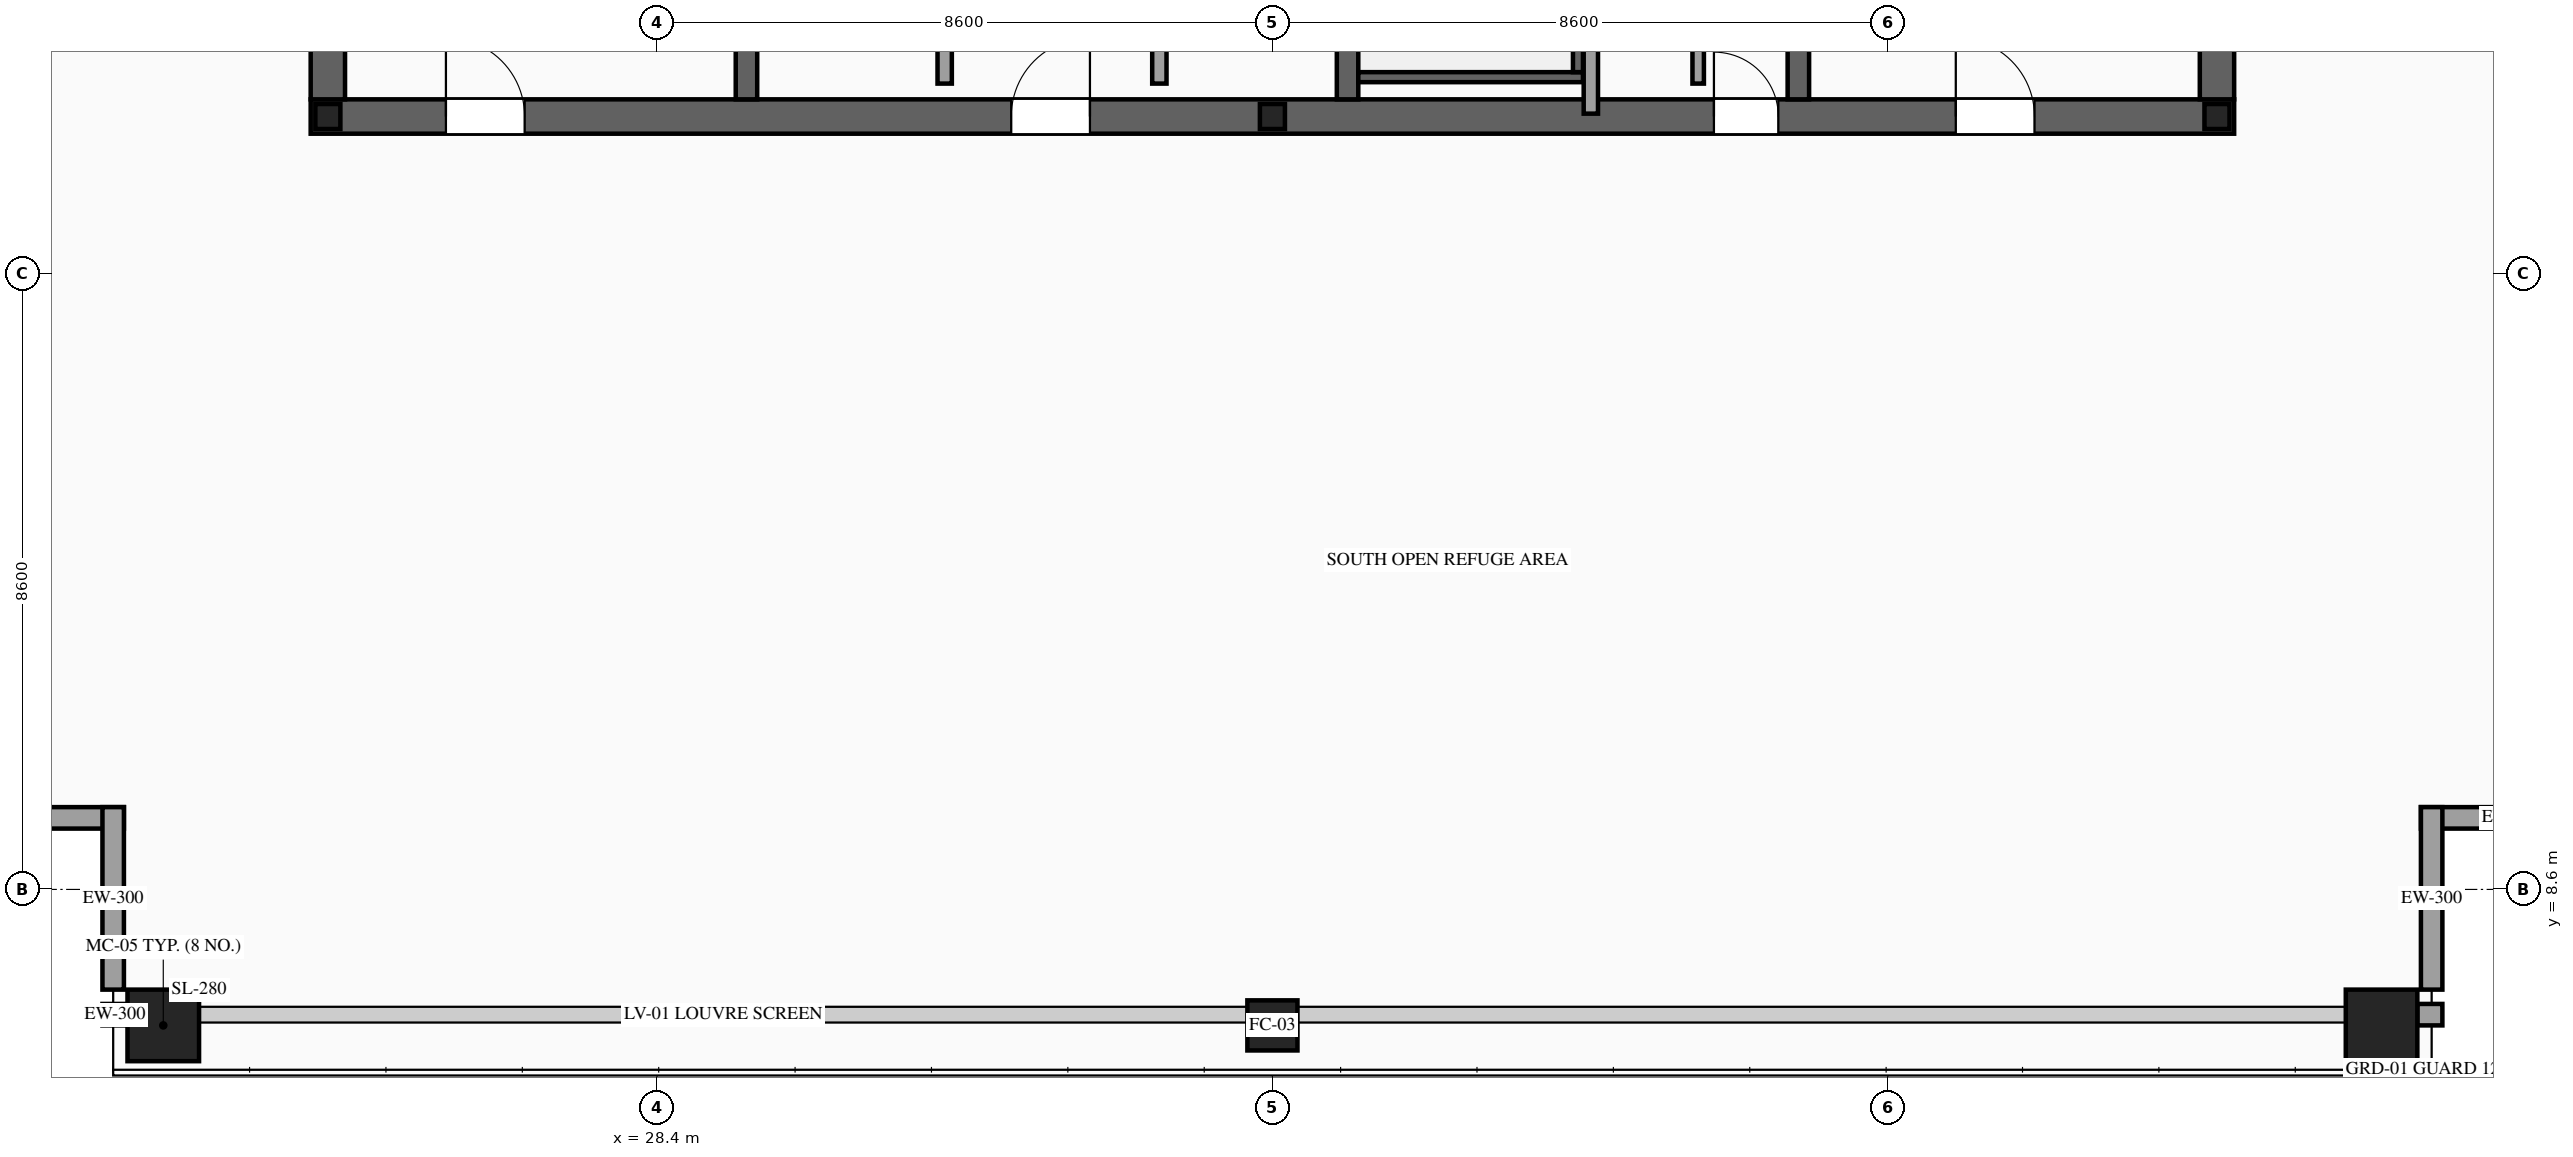
"""IFC4 building model, lengths in metres.
Left out: names, types, materials, properties, quantities, classifications, styles, units other than length and angle.
Written with IfcOpenShell. Run it as: python <this file> out.ifc"""

import sys

from ifc_helpers import new_model, si_unit, direction, frame, frame_2d, origin, origin_2d, place, context, subcontext, project, spatial, rectangle, hollow_rectangle, i_section, extrude, source, transform, mapped, element, fill, save


model = new_model("IFC4")
c1 = context("Model", 3, precision=1e-05, world=origin(), true_north=direction((0.0, 1.0)))
c2 = subcontext(c1, "Body", "Model", "MODEL_VIEW")
j1 = project(units=[si_unit("LENGTHUNIT", "METRE"), si_unit("PLANEANGLEUNIT", "RADIAN")], contexts=[c1])
p1 = place(None, origin())
s1 = spatial("IfcSite", under=j1, at=p1, CompositionType="ELEMENT")
p2 = place(p1, origin())
s2 = spatial("IfcBuilding", under=s1, at=p2, CompositionType="ELEMENT")
p3 = place(p2, frame((0.0, 0.0, 306.6)))
s3 = spatial("IfcBuildingStorey", under=s2, at=p3, CompositionType="ELEMENT", Elevation=306.6)
p4 = place(p3, frame((23.56, 19.4, 0.0), z_axis=(0.0, 0.0, 1.0), x_axis=(1.0, 0.0, 0.0)))
e1 = element("IfcWall", 1, at=p4, inside=s3, PredefinedType="SHEAR", context=c2, shape_type="SweptSolid", body=[
    extrude(rectangle(XDim=26.88, YDim=0.48, at=frame_2d((13.44, 0.0))), origin(), (0.0, 0.0, 1.0), 4.6),
])
p5 = place(p4, frame((1.89, 0.0, 0.0)))
e2 = element("IfcOpeningElement", 2, at=p5, cuts=e1, PredefinedType="OPENING", context=c2, shape_type="SweptSolid", body=[
    extrude(rectangle(XDim=1.1, YDim=2.2, at=frame_2d((0.55, 1.1))), frame((0.0, 0.255, 0.0), z_axis=(0.0, -1.0, 0.0), x_axis=(1.0, 0.0, 0.0)), (0.0, 0.0, 1.0), 0.51),
])
p6 = place(p4, frame((9.79, 0.0, 0.0)))
e3 = element("IfcOpeningElement", 3, at=p6, cuts=e1, PredefinedType="OPENING", context=c2, shape_type="SweptSolid", body=[
    extrude(rectangle(XDim=1.1, YDim=2.2, at=frame_2d((0.55, 1.1))), frame((0.0, 0.255, 0.0), z_axis=(0.0, -1.0, 0.0), x_axis=(1.0, 0.0, 0.0)), (0.0, 0.0, 1.0), 0.51),
])
p7 = place(p4, frame((22.99, 0.0, 0.0)))
e4 = element("IfcOpeningElement", 4, at=p7, cuts=e1, PredefinedType="OPENING", context=c2, shape_type="SweptSolid", body=[
    extrude(rectangle(XDim=1.1, YDim=2.2, at=frame_2d((0.55, 1.1))), frame((0.0, 0.255, 0.0), z_axis=(0.0, -1.0, 0.0), x_axis=(1.0, 0.0, 0.0)), (0.0, 0.0, 1.0), 0.51),
])
p8 = place(p4, frame((19.61, 0.0, 0.0)))
e5 = element("IfcOpeningElement", 5, at=p8, cuts=e1, PredefinedType="OPENING", context=c2, shape_type="SweptSolid", body=[
    extrude(rectangle(XDim=0.9, YDim=2.15, at=frame_2d((0.45, 1.075))), frame((0.0, 0.255, 0.0), z_axis=(0.0, -1.0, 0.0), x_axis=(1.0, 0.0, 0.0)), (0.0, 0.0, 1.0), 0.51),
])
m1 = source(origin(), c2, "Body", "SweptSolid", [
    extrude(rectangle(XDim=12.32, YDim=0.48, at=frame_2d((6.16, 0.0))), origin(), (0.0, 0.0, 1.0), 4.6),
])
for number, where, z_axis, x_axis in (
    (6, (23.8, 19.64, 0.0), (0.0, 0.0, 1.0), (0.0, 1.0, 0.0)),
    (7, (50.2, 19.64, 0.0), (0.0, 0.0, 1.0), (0.0, 1.0, 0.0)),
):
    element("IfcWall", number, at=place(p3, frame(where, z_axis=z_axis, x_axis=x_axis)), inside=s3, PredefinedType="SHEAR", context=c2, shape_type="MappedRepresentation", body=[
        mapped(m1, transform((0.0, 0.0, 0.0), scale=1.0)),
    ])
m2 = source(origin(), c2, "Body", "SweptSolid", [
    extrude(rectangle(XDim=12.32, YDim=0.3, at=frame_2d((6.16, 0.0))), origin(), (0.0, 0.0, 1.0), 4.6),
])
for number, where, z_axis, x_axis in (
    (8, (29.65, 19.64, 0.0), (0.0, 0.0, 1.0), (0.0, 1.0, 0.0)),
    (9, (38.05, 19.64, 0.0), (0.0, 0.0, 1.0), (0.0, 1.0, 0.0)),
):
    element("IfcWall", number, at=place(p3, frame(where, z_axis=z_axis, x_axis=x_axis)), inside=s3, PredefinedType="SOLIDWALL", context=c2, shape_type="MappedRepresentation", body=[
        mapped(m2, transform((0.0, 0.0, 0.0), scale=1.0)),
    ])
p9 = place(p3, frame((44.35, 19.64, 0.0), z_axis=(0.0, 0.0, 1.0), x_axis=(0.0, 1.0, 0.0)))
e10 = element("IfcWall", 10, at=p9, inside=s3, PredefinedType="SOLIDWALL", context=c2, shape_type="SweptSolid", body=[
    extrude(rectangle(XDim=12.32, YDim=0.3, at=frame_2d((6.16, 0.0))), origin(), (0.0, 0.0, 1.0), 4.6),
])
p10 = place(p9, frame((6.56, 0.0, 0.0)))
e11 = element("IfcOpeningElement", 11, at=p10, cuts=e10, PredefinedType="OPENING", context=c2, shape_type="SweptSolid", body=[
    extrude(rectangle(XDim=1.1, YDim=2.2, at=frame_2d((0.55, 1.1))), frame((0.0, 0.165, 0.0), z_axis=(0.0, -1.0, 0.0), x_axis=(1.0, 0.0, 0.0)), (0.0, 0.0, 1.0), 0.33),
])
p11 = place(p9, frame((8.66, 0.0, 0.0)))
e12 = element("IfcOpeningElement", 12, at=p11, cuts=e10, PredefinedType="OPENING", context=c2, shape_type="SweptSolid", body=[
    extrude(rectangle(XDim=1.1, YDim=2.2, at=frame_2d((0.55, 1.1))), frame((0.0, 0.165, 0.0), z_axis=(0.0, -1.0, 0.0), x_axis=(1.0, 0.0, 0.0)), (0.0, 0.0, 1.0), 0.33),
])
p12 = place(p9, frame((10.76, 0.0, 0.0)))
e13 = element("IfcOpeningElement", 13, at=p12, cuts=e10, PredefinedType="OPENING", context=c2, shape_type="SweptSolid", body=[
    extrude(rectangle(XDim=1.1, YDim=2.2, at=frame_2d((0.55, 1.1))), frame((0.0, 0.165, 0.0), z_axis=(0.0, -1.0, 0.0), x_axis=(1.0, 0.0, 0.0)), (0.0, 0.0, 1.0), 0.33),
])
m3 = source(origin(), c2, "Body", "SweptSolid", [
    extrude(i_section(OverallWidth=0.35, OverallDepth=0.35, WebThickness=0.012, FlangeThickness=0.019, at=origin_2d()), origin(), (0.0, 0.0, 1.0), 4.6),
])
for number, where, z_axis, x_axis in (
    (14, (23.8, 19.4, 0.0), (0.0, 0.0, 1.0), (1.0, 0.0, 0.0)),
    (15, (37.0, 19.4, 0.0), (0.0, 0.0, 1.0), (1.0, 0.0, 0.0)),
    (16, (50.2, 19.4, 0.0), (0.0, 0.0, 1.0), (1.0, 0.0, 0.0)),
):
    element("IfcColumn", number, at=place(p3, frame(where, z_axis=z_axis, x_axis=x_axis)), inside=s3, PredefinedType="COLUMN", context=c2, shape_type="MappedRepresentation", body=[
        mapped(m3, transform((0.0, 0.0, 0.0), scale=1.0)),
    ])
m4 = source(origin(), c2, "Body", "SweptSolid", [
    extrude(hollow_rectangle(XDim=1.0, YDim=1.0, WallThickness=0.048, at=origin_2d()), origin(), (0.0, 0.0, 1.0), 4.6),
])
p13 = place(p3, frame((21.5, 6.7, 0.0), z_axis=(0.0, 0.0, 1.0), x_axis=(1.0, 0.0, 0.0)))
e17 = element("IfcColumn", 17, at=p13, inside=s3, PredefinedType="COLUMN", context=c2, shape_type="MappedRepresentation", body=[
    mapped(m4, transform((0.0, 0.0, 0.0), scale=1.0)),
])
m5 = source(origin(), c2, "Body", "SweptSolid", [
    extrude(hollow_rectangle(XDim=0.7, YDim=0.7, WallThickness=0.032, at=origin_2d()), origin(), (0.0, 0.0, 1.0), 4.6),
])
p14 = place(p3, frame((37.0, 6.7, 0.0), z_axis=(0.0, 0.0, 1.0), x_axis=(1.0, 0.0, 0.0)))
e18 = element("IfcColumn", 18, at=p14, inside=s3, PredefinedType="COLUMN", context=c2, shape_type="MappedRepresentation", body=[
    mapped(m5, transform((0.0, 0.0, 0.0), scale=1.0)),
])
p15 = place(p3, frame((52.5, 6.7, 0.0), z_axis=(0.0, 0.0, 1.0), x_axis=(1.0, 0.0, 0.0)))
e19 = element("IfcColumn", 19, at=p15, inside=s3, PredefinedType="COLUMN", context=c2, shape_type="MappedRepresentation", body=[
    mapped(m4, transform((0.0, 0.0, 0.0), scale=1.0)),
])
m6 = source(origin(), c2, "Body", "SweptSolid", [
    extrude(rectangle(XDim=2.55, YDim=0.3, at=frame_2d((1.275, 0.0))), origin(), (0.0, 0.0, 1.0), 4.38),
])
for number, where, z_axis, x_axis in (
    (20, (18.4, 9.6, 0.0), (0.0, 0.0, 1.0), (1.0, 0.0, 0.0)),
    (21, (20.8, 9.75, 0.0), (0.0, 0.0, 1.0), (0.0, -1.0, 0.0)),
    (22, (53.05, 9.6, 0.0), (0.0, 0.0, 1.0), (1.0, 0.0, 0.0)),
    (23, (53.2, 7.2, 0.0), (0.0, 0.0, 1.0), (0.0, 1.0, 0.0)),
):
    element("IfcWall", number, at=place(p3, frame(where, z_axis=z_axis, x_axis=x_axis)), inside=s3, PredefinedType="SOLIDWALL", context=c2, shape_type="MappedRepresentation", body=[
        mapped(m6, transform((0.0, 0.0, 0.0), scale=1.0)),
    ])
m7 = source(origin(), c2, "Body", "SweptSolid", [
    extrude(rectangle(XDim=0.35, YDim=0.3, at=frame_2d((0.175, 0.0))), origin(), (0.0, 0.0, 1.0), 4.38),
])
for number, where, z_axis, x_axis in (
    (24, (20.65, 6.85, 0.0), (0.0, 0.0, 1.0), (1.0, 0.0, 0.0)),
    (25, (53.0, 6.85, 0.0), (0.0, 0.0, 1.0), (1.0, 0.0, 0.0)),
):
    element("IfcWall", number, at=place(p3, frame(where, z_axis=z_axis, x_axis=x_axis)), inside=s3, PredefinedType="SOLIDWALL", context=c2, shape_type="MappedRepresentation", body=[
        mapped(m7, transform((0.0, 0.0, 0.0), scale=1.0)),
    ])
m8 = source(origin(), c2, "Body", "SweptSolid", [
    extrude(rectangle(XDim=3.14, YDim=0.14, at=frame_2d((1.57, 0.0))), origin(), (0.0, 0.0, 1.0), 4.38),
])
p16 = place(p3, frame((38.2, 19.95, 0.0), z_axis=(0.0, 0.0, 1.0), x_axis=(1.0, 0.0, 0.0)))
e26 = element("IfcWall", 26, at=p16, inside=s3, PredefinedType="SOLIDWALL", context=c2, shape_type="MappedRepresentation", body=[
    mapped(m8, transform((0.0, 0.0, 0.0), scale=1.0)),
])
m9 = source(origin(), c2, "Body", "SweptSolid", [
    extrude(rectangle(XDim=8.94, YDim=0.14, at=frame_2d((4.47, 0.0))), origin(), (0.0, 0.0, 1.0), 4.38),
])
p17 = place(p3, frame((41.27, 20.02, 0.0), z_axis=(0.0, 0.0, 1.0), x_axis=(0.0, 1.0, 0.0)))
e27 = element("IfcWall", 27, at=p17, inside=s3, PredefinedType="SOLIDWALL", context=c2, shape_type="MappedRepresentation", body=[
    mapped(m9, transform((0.0, 0.0, 0.0), scale=1.0)),
])
p18 = place(p3, frame((32.42, 19.86, 0.0), z_axis=(0.0, 0.0, 1.0), x_axis=(0.0, 1.0, 0.0)))
e28 = element("IfcWall", 28, at=p18, inside=s3, PredefinedType="PARTITIONING", context=c2, shape_type="SweptSolid", body=[
    extrude(rectangle(XDim=11.88, YDim=0.2, at=frame_2d((5.94, 0.0))), origin(), (0.0, 0.0, 1.0), 4.38),
])
p19 = place(p18, frame((5.49, 0.0, 0.0)))
e29 = element("IfcOpeningElement", 29, at=p19, cuts=e28, PredefinedType="OPENING", context=c2, shape_type="SweptSolid", body=[
    extrude(rectangle(XDim=0.9, YDim=2.15, at=frame_2d((0.45, 1.075))), frame((0.0, 0.115, 0.0), z_axis=(0.0, -1.0, 0.0), x_axis=(1.0, 0.0, 0.0)), (0.0, 0.0, 1.0), 0.23),
])
p20 = place(p3, frame((35.42, 19.86, 0.0), z_axis=(0.0, 0.0, 1.0), x_axis=(0.0, 1.0, 0.0)))
e30 = element("IfcWall", 30, at=p20, inside=s3, PredefinedType="PARTITIONING", context=c2, shape_type="SweptSolid", body=[
    extrude(rectangle(XDim=9.19, YDim=0.2, at=frame_2d((4.595, 0.0))), origin(), (0.0, 0.0, 1.0), 4.38),
])
p21 = place(p20, frame((4.145, 0.0, 0.0)))
e31 = element("IfcOpeningElement", 31, at=p21, cuts=e30, PredefinedType="OPENING", context=c2, shape_type="SweptSolid", body=[
    extrude(rectangle(XDim=0.9, YDim=2.15, at=frame_2d((0.45, 1.075))), frame((0.0, 0.115, 0.0), z_axis=(0.0, -1.0, 0.0), x_axis=(1.0, 0.0, 0.0)), (0.0, 0.0, 1.0), 0.23),
])
m10 = source(origin(), c2, "Body", "SweptSolid", [
    extrude(rectangle(XDim=1.34, YDim=0.16, at=frame_2d((0.67, 0.0))), origin(), (0.0, 0.0, 1.0), 4.38),
])
p22 = place(p3, frame((42.95, 19.86, 0.0), z_axis=(0.0, 0.0, 1.0), x_axis=(0.0, 1.0, 0.0)))
e32 = element("IfcWall", 32, at=p22, inside=s3, PredefinedType="PARTITIONING", context=c2, shape_type="MappedRepresentation", body=[
    mapped(m10, transform((0.0, 0.0, 0.0), scale=1.0)),
])
m11 = source(origin(), c2, "Body", "SweptSolid", [
    extrude(rectangle(XDim=6.06, YDim=0.2, at=frame_2d((3.03, 0.0))), origin(), (0.0, 0.0, 1.0), 4.38),
])
p23 = place(p3, frame((41.45, 19.44, 0.0), z_axis=(0.0, 0.0, 1.0), x_axis=(0.0, 1.0, 0.0)))
e33 = element("IfcWall", 33, at=p23, inside=s3, PredefinedType="PARTITIONING", context=c2, shape_type="MappedRepresentation", body=[
    mapped(m11, transform((0.0, 0.0, 0.0), scale=1.0)),
])
m12 = source(origin(), c2, "Body", "SweptSolid", [
    extrude(rectangle(XDim=1.1, YDim=2.2, at=frame_2d((0.55, 1.1))), frame((0.0, 0.025, 0.0), z_axis=(0.0, -1.0, 0.0), x_axis=(1.0, 0.0, 0.0)), (0.0, 0.0, 1.0), 0.05),
])
p24 = place(p5, origin())
e34 = element("IfcDoor", 34, at=p24, inside=s3, OperationType="SINGLE_SWING_LEFT", PredefinedType="DOOR", context=c2, shape_type="MappedRepresentation", body=[
    mapped(m12, transform((0.0, 0.0, 0.0), scale=1.0)),
])
fill(e2, e34)
p25 = place(p6, origin())
e35 = element("IfcDoor", 35, at=p25, inside=s3, OperationType="SINGLE_SWING_RIGHT", PredefinedType="DOOR", context=c2, shape_type="MappedRepresentation", body=[
    mapped(m12, transform((0.0, 0.0, 0.0), scale=1.0)),
])
fill(e3, e35)
p26 = place(p7, origin())
e36 = element("IfcDoor", 36, at=p26, inside=s3, OperationType="SINGLE_SWING_LEFT", PredefinedType="DOOR", context=c2, shape_type="MappedRepresentation", body=[
    mapped(m12, transform((0.0, 0.0, 0.0), scale=1.0)),
])
fill(e4, e36)
m13 = source(origin(), c2, "Body", "SweptSolid", [
    extrude(rectangle(XDim=0.9, YDim=2.15, at=frame_2d((0.45, 1.075))), frame((0.0, 0.025, 0.0), z_axis=(0.0, -1.0, 0.0), x_axis=(1.0, 0.0, 0.0)), (0.0, 0.0, 1.0), 0.05),
])
p27 = place(p8, origin())
e37 = element("IfcDoor", 37, at=p27, inside=s3, OperationType="SINGLE_SWING_LEFT", PredefinedType="DOOR", context=c2, shape_type="MappedRepresentation", body=[
    mapped(m13, transform((0.0, 0.0, 0.0), scale=1.0)),
])
fill(e5, e37)
save(model, sys.argv[1])
